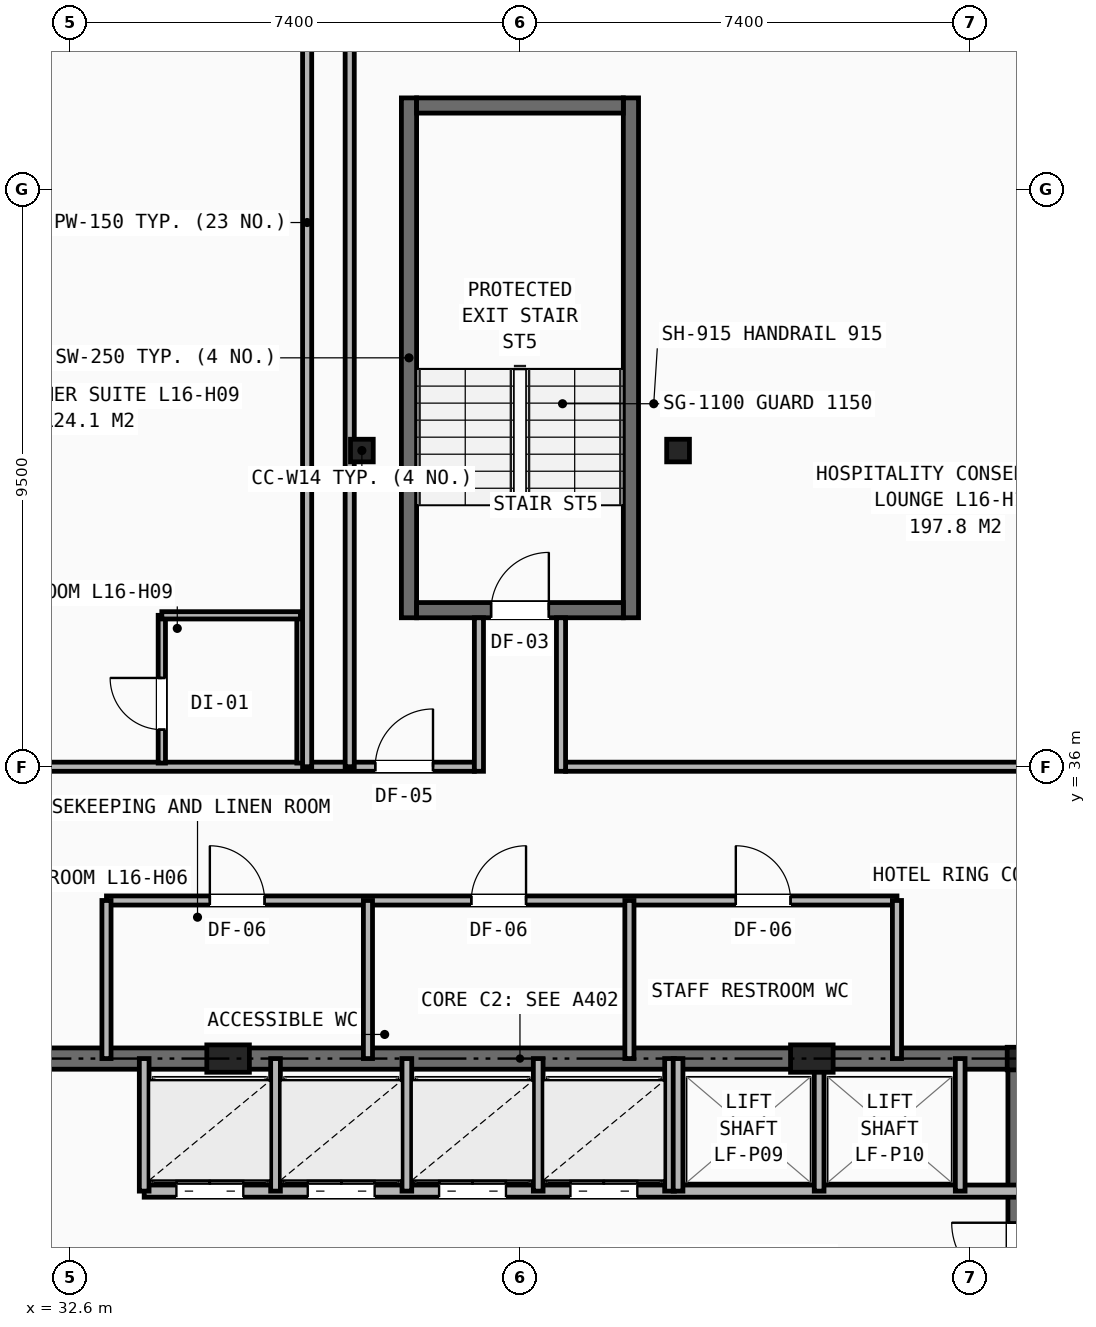
"""IFC4 building model, lengths in metres.
Left out: names, types, materials, properties, quantities, classifications, styles, units other than length and angle.
Written with IfcOpenShell. Run it as: python <this file> out.ifc"""

import sys

from ifc_helpers import new_model, si_unit, direction, frame, frame_2d, origin, origin_2d, place, context, subcontext, project, spatial, rectangle, i_section, extrude, element, fill, save


model = new_model("IFC4")
c1 = context("Model", 3, precision=1e-05, world=origin(), true_north=direction((0.0, 1.0)))
c2 = subcontext(c1, "Body", "Model", "MODEL_VIEW")
j1 = project(units=[si_unit("LENGTHUNIT", "METRE"), si_unit("PLANEANGLEUNIT", "RADIAN")], contexts=[c1])
p1 = place(None, origin())
s1 = spatial("IfcSite", under=j1, at=p1, CompositionType="ELEMENT")
p2 = place(p1, origin())
s2 = spatial("IfcBuilding", under=s1, at=p2, CompositionType="ELEMENT")
p3 = place(p2, frame((0.0, 0.0, 59.2)))
s3 = spatial("IfcBuildingStorey", under=s2, at=p3, CompositionType="ELEMENT", Elevation=59.2)
for number, where, z_axis, x_axis in (
    (1, (48.2, 31.2, 0.0), (0.0, 0.0, 1.0), (1.0, 0.0, 0.0)),
    (2, (37.4, 41.2, 0.0), (0.0, 0.0, 1.0), (1.0, 0.0, 0.0)),
    (3, (42.6, 41.2, 0.0), (0.0, 0.0, 1.0), (1.0, 0.0, 0.0)),
):
    element("IfcColumn", number, at=place(p3, frame(where, z_axis=z_axis, x_axis=x_axis)), inside=s3, PredefinedType="COLUMN", context=c2, shape_type="SweptSolid", body=[
        extrude(i_section(OverallWidth=0.374, OverallDepth=0.372, WebThickness=0.016, FlangeThickness=0.026, at=origin_2d()), origin(), (0.0, 0.0, 1.0), 3.2),
    ])
for number, where, z_axis, x_axis in (
    (4, (35.2, 31.2, 0.0), (0.0, 0.0, 1.0), (1.0, 0.0, 0.0)),
    (5, (44.8, 31.2, 0.0), (0.0, 0.0, 1.0), (1.0, 0.0, 0.0)),
):
    element("IfcColumn", number, at=place(p3, frame(where, z_axis=z_axis, x_axis=x_axis)), inside=s3, PredefinedType="PILASTER", context=c2, shape_type="SweptSolid", body=[
        extrude(rectangle(XDim=0.7, YDim=0.45, at=origin_2d()), origin(), (0.0, 0.0, 1.0), 3.2),
    ])
p4 = place(p3, frame((31.8, 31.2, 0.0), z_axis=(0.0, 0.0, 1.0), x_axis=(1.0, 0.0, 0.0)))
e6 = element("IfcWall", 6, at=p4, inside=s3, PredefinedType="SHEAR", context=c2, shape_type="SweptSolid", body=[
    extrude(rectangle(XDim=16.4, YDim=0.35, at=frame_2d((8.2, 0.0))), origin(), (0.0, 0.0, 1.0), 2.98),
])
p5 = place(p3, frame((48.2, 16.4, 0.0), z_axis=(0.0, 0.0, 1.0), x_axis=(0.0, 1.0, 0.0)))
e7 = element("IfcWall", 7, at=p5, inside=s3, PredefinedType="SHEAR", context=c2, shape_type="SweptSolid", body=[
    extrude(rectangle(XDim=14.8, YDim=0.35, at=frame_2d((7.4, 0.0))), origin(), (0.0, 0.0, 1.0), 2.98),
])
p6 = place(p5, frame((11.0, 0.0, 0.0)))
e8 = element("IfcOpeningElement", 8, at=p6, cuts=e7, PredefinedType="OPENING", context=c2, shape_type="SweptSolid", body=[
    extrude(rectangle(XDim=1.1, YDim=2.15, at=frame_2d((0.55, 1.075))), frame((0.0, 0.185, 0.0), z_axis=(0.0, -1.0, 0.0), x_axis=(1.0, 0.0, 0.0)), (0.0, 0.0, 1.0), 0.37),
])
p7 = place(p3, frame((33.82, 29.02, 0.0), z_axis=(0.0, 0.0, 1.0), x_axis=(1.0, 0.0, 0.0)))
e9 = element("IfcWall", 9, at=p7, inside=s3, PredefinedType="SOLIDWALL", context=c2, shape_type="SweptSolid", body=[
    extrude(rectangle(XDim=14.38, YDim=0.2, at=frame_2d((7.19, 0.0))), origin(), (0.0, 0.0, 1.0), 2.431),
])
p8 = place(p7, frame((0.53, 0.0, 0.0)))
e10 = element("IfcOpeningElement", 10, at=p8, cuts=e9, PredefinedType="OPENING", context=c2, shape_type="SweptSolid", body=[
    extrude(rectangle(XDim=1.1, YDim=2.15, at=frame_2d((0.55, 1.075))), frame((0.0, 0.11, 0.0), z_axis=(0.0, -1.0, 0.0), x_axis=(1.0, 0.0, 0.0)), (0.0, 0.0, 1.0), 0.22),
])
p9 = place(p7, frame((2.69, 0.0, 0.0)))
e11 = element("IfcOpeningElement", 11, at=p9, cuts=e9, PredefinedType="OPENING", context=c2, shape_type="SweptSolid", body=[
    extrude(rectangle(XDim=1.1, YDim=2.15, at=frame_2d((0.55, 1.075))), frame((0.0, 0.11, 0.0), z_axis=(0.0, -1.0, 0.0), x_axis=(1.0, 0.0, 0.0)), (0.0, 0.0, 1.0), 0.22),
])
p10 = place(p7, frame((4.85, 0.0, 0.0)))
e12 = element("IfcOpeningElement", 12, at=p10, cuts=e9, PredefinedType="OPENING", context=c2, shape_type="SweptSolid", body=[
    extrude(rectangle(XDim=1.1, YDim=2.15, at=frame_2d((0.55, 1.075))), frame((0.0, 0.11, 0.0), z_axis=(0.0, -1.0, 0.0), x_axis=(1.0, 0.0, 0.0)), (0.0, 0.0, 1.0), 0.22),
])
p11 = place(p7, frame((7.01, 0.0, 0.0)))
e13 = element("IfcOpeningElement", 13, at=p11, cuts=e9, PredefinedType="OPENING", context=c2, shape_type="SweptSolid", body=[
    extrude(rectangle(XDim=1.1, YDim=2.15, at=frame_2d((0.55, 1.075))), frame((0.0, 0.11, 0.0), z_axis=(0.0, -1.0, 0.0), x_axis=(1.0, 0.0, 0.0)), (0.0, 0.0, 1.0), 0.22),
])
for number, where, z_axis, x_axis in (
    (14, (33.82, 29.02, 0.0), (0.0, 0.0, 1.0), (0.0, 1.0, 0.0)),
    (15, (35.98, 29.02, 0.0), (0.0, 0.0, 1.0), (0.0, 1.0, 0.0)),
    (16, (38.14, 29.02, 0.0), (0.0, 0.0, 1.0), (0.0, 1.0, 0.0)),
    (17, (40.3, 29.02, 0.0), (0.0, 0.0, 1.0), (0.0, 1.0, 0.0)),
    (18, (42.46, 29.02, 0.0), (0.0, 0.0, 1.0), (0.0, 1.0, 0.0)),
    (19, (42.6, 29.02, 0.0), (0.0, 0.0, 1.0), (0.0, 1.0, 0.0)),
    (20, (44.92, 29.02, 0.0), (0.0, 0.0, 1.0), (0.0, 1.0, 0.0)),
    (21, (47.24, 29.02, 0.0), (0.0, 0.0, 1.0), (0.0, 1.0, 0.0)),
):
    element("IfcWall", number, at=place(p3, frame(where, z_axis=z_axis, x_axis=x_axis)), inside=s3, PredefinedType="SOLIDWALL", context=c2, shape_type="SweptSolid", body=[
        extrude(rectangle(XDim=2.18, YDim=0.16, at=frame_2d((1.09, 0.0))), origin(), (0.0, 0.0, 1.0), 2.431),
    ])
p12 = place(p3, frame((33.2, 33.8, 0.0), z_axis=(0.0, 0.0, 1.0), x_axis=(1.0, 0.0, 0.0)))
e22 = element("IfcWall", 22, at=p12, inside=s3, PredefinedType="PARTITIONING", context=c2, shape_type="SweptSolid", body=[
    extrude(rectangle(XDim=13.0, YDim=0.15, at=frame_2d((6.5, 0.0))), origin(), (0.0, 0.0, 1.0), 2.98),
])
p13 = place(p12, frame((1.7, 0.0, 0.0)))
e23 = element("IfcOpeningElement", 23, at=p13, cuts=e22, PredefinedType="OPENING", context=c2, shape_type="SweptSolid", body=[
    extrude(rectangle(XDim=0.9, YDim=2.1, at=frame_2d((0.45, 1.05))), frame((0.0, 0.085, 0.0), z_axis=(0.0, -1.0, 0.0), x_axis=(1.0, 0.0, 0.0)), (0.0, 0.0, 1.0), 0.17),
])
p14 = place(p12, frame((6.0, 0.0, 0.0)))
e24 = element("IfcOpeningElement", 24, at=p14, cuts=e22, PredefinedType="OPENING", context=c2, shape_type="SweptSolid", body=[
    extrude(rectangle(XDim=0.9, YDim=2.1, at=frame_2d((0.45, 1.05))), frame((0.0, 0.085, 0.0), z_axis=(0.0, -1.0, 0.0), x_axis=(1.0, 0.0, 0.0)), (0.0, 0.0, 1.0), 0.17),
])
p15 = place(p12, frame((10.35, 0.0, 0.0)))
e25 = element("IfcOpeningElement", 25, at=p15, cuts=e22, PredefinedType="OPENING", context=c2, shape_type="SweptSolid", body=[
    extrude(rectangle(XDim=0.9, YDim=2.1, at=frame_2d((0.45, 1.05))), frame((0.0, 0.085, 0.0), z_axis=(0.0, -1.0, 0.0), x_axis=(1.0, 0.0, 0.0)), (0.0, 0.0, 1.0), 0.17),
])
for number, where, z_axis, x_axis in (
    (26, (33.2, 31.2, 0.0), (0.0, 0.0, 1.0), (0.0, 1.0, 0.0)),
    (27, (46.2, 31.2, 0.0), (0.0, 0.0, 1.0), (0.0, 1.0, 0.0)),
    (28, (37.5, 31.2, 0.0), (0.0, 0.0, 1.0), (0.0, 1.0, 0.0)),
    (29, (41.8, 31.2, 0.0), (0.0, 0.0, 1.0), (0.0, 1.0, 0.0)),
):
    element("IfcWall", number, at=place(p3, frame(where, z_axis=z_axis, x_axis=x_axis)), inside=s3, PredefinedType="PARTITIONING", context=c2, shape_type="SweptSolid", body=[
        extrude(rectangle(XDim=2.6, YDim=0.15, at=frame_2d((1.3, 0.0))), origin(), (0.0, 0.0, 1.0), 2.431),
    ])
p16 = place(p3, frame((29.6, 36.0, 0.0), z_axis=(0.0, 0.0, 1.0), x_axis=(1.0, 0.0, 0.0)))
e30 = element("IfcWall", 30, at=p16, inside=s3, PredefinedType="PARTITIONING", context=c2, shape_type="SweptSolid", body=[
    extrude(rectangle(XDim=9.65, YDim=0.15, at=frame_2d((4.825, 0.0))), origin(), (0.0, 0.0, 1.0), 2.98),
])
p17 = place(p16, frame((0.57, 0.0, 0.0)))
e31 = element("IfcOpeningElement", 31, at=p17, cuts=e30, PredefinedType="OPENING", context=c2, shape_type="SweptSolid", body=[
    extrude(rectangle(XDim=0.95, YDim=2.1, at=frame_2d((0.475, 1.05))), frame((0.0, 0.085, 0.0), z_axis=(0.0, -1.0, 0.0), x_axis=(1.0, 0.0, 0.0)), (0.0, 0.0, 1.0), 0.17),
])
p18 = place(p16, frame((8.02, 0.0, 0.0)))
e32 = element("IfcOpeningElement", 32, at=p18, cuts=e30, PredefinedType="OPENING", context=c2, shape_type="SweptSolid", body=[
    extrude(rectangle(XDim=0.95, YDim=2.1, at=frame_2d((0.475, 1.05))), frame((0.0, 0.085, 0.0), z_axis=(0.0, -1.0, 0.0), x_axis=(1.0, 0.0, 0.0)), (0.0, 0.0, 1.0), 0.17),
])
p19 = place(p3, frame((40.75, 36.0, 0.0), z_axis=(0.0, 0.0, 1.0), x_axis=(1.0, 0.0, 0.0)))
e33 = element("IfcWall", 33, at=p19, inside=s3, PredefinedType="PARTITIONING", context=c2, shape_type="SweptSolid", body=[
    extrude(rectangle(XDim=9.65, YDim=0.15, at=frame_2d((4.825, 0.0))), origin(), (0.0, 0.0, 1.0), 2.513),
])
p20 = place(p3, frame((34.11, 36.06, 0.0), z_axis=(0.0, 0.0, 1.0), x_axis=(0.0, 1.0, 0.0)))
e34 = element("IfcWall", 34, at=p20, inside=s3, PredefinedType="PARTITIONING", context=c2, shape_type="SweptSolid", body=[
    extrude(rectangle(XDim=2.43, YDim=0.12, at=frame_2d((1.215, 0.0))), origin(), (0.0, 0.0, 1.0), 2.98),
])
p21 = place(p20, frame((0.55, 0.0, 0.0)))
e35 = element("IfcOpeningElement", 35, at=p21, cuts=e34, PredefinedType="OPENING", context=c2, shape_type="SweptSolid", body=[
    extrude(rectangle(XDim=0.85, YDim=2.05, at=frame_2d((0.425, 1.025))), frame((0.0, 0.07, 0.0), z_axis=(0.0, -1.0, 0.0), x_axis=(1.0, 0.0, 0.0)), (0.0, 0.0, 1.0), 0.14),
])
p22 = place(p3, frame((36.39, 36.06, 0.0), z_axis=(0.0, 0.0, 1.0), x_axis=(0.0, 1.0, 0.0)))
e36 = element("IfcWall", 36, at=p22, inside=s3, PredefinedType="PARTITIONING", context=c2, shape_type="SweptSolid", body=[
    extrude(rectangle(XDim=2.43, YDim=0.12, at=frame_2d((1.215, 0.0))), origin(), (0.0, 0.0, 1.0), 2.98),
])
p23 = place(p3, frame((34.11, 38.49, 0.0), z_axis=(0.0, 0.0, 1.0), x_axis=(1.0, 0.0, 0.0)))
e37 = element("IfcWall", 37, at=p23, inside=s3, PredefinedType="PARTITIONING", context=c2, shape_type="SweptSolid", body=[
    extrude(rectangle(XDim=2.28, YDim=0.12, at=frame_2d((1.14, 0.0))), origin(), (0.0, 0.0, 1.0), 2.98),
])
for number, where, z_axis, x_axis in (
    (38, (36.5, 36.0, 0.0), (0.0, 0.0, 1.0), (0.0, 1.0, 0.0)),
    (39, (37.2, 36.0, 0.0), (0.0, 0.0, 1.0), (0.0, 1.0, 0.0)),
):
    element("IfcWall", number, at=place(p3, frame(where, z_axis=z_axis, x_axis=x_axis)), inside=s3, PredefinedType="PARTITIONING", context=c2, shape_type="SweptSolid", body=[
        extrude(rectangle(XDim=17.9, YDim=0.15, at=frame_2d((8.95, 0.0))), origin(), (0.0, 0.0, 1.0), 2.191),
    ])
for number, where, z_axis, x_axis in (
    (40, (38.175, 38.45, 0.0), (0.0, 0.0, 1.0), (0.0, 1.0, 0.0)),
    (41, (41.825, 38.45, 0.0), (0.0, 0.0, 1.0), (0.0, 1.0, 0.0)),
):
    element("IfcWall", number, at=place(p3, frame(where, z_axis=z_axis, x_axis=x_axis)), inside=s3, PredefinedType="SHEAR", context=c2, shape_type="SweptSolid", body=[
        extrude(rectangle(XDim=8.55, YDim=0.25, at=frame_2d((4.275, 0.0))), origin(), (0.0, 0.0, 1.0), 2.98),
    ])
p24 = place(p3, frame((38.3, 38.575, 0.0), z_axis=(0.0, 0.0, 1.0), x_axis=(1.0, 0.0, 0.0)))
e42 = element("IfcWall", 42, at=p24, inside=s3, PredefinedType="SHEAR", context=c2, shape_type="SweptSolid", body=[
    extrude(rectangle(XDim=3.4, YDim=0.25, at=frame_2d((1.7, 0.0))), origin(), (0.0, 0.0, 1.0), 2.98),
])
p25 = place(p24, frame((1.225, 0.0, 0.0)))
e43 = element("IfcOpeningElement", 43, at=p25, cuts=e42, PredefinedType="OPENING", context=c2, shape_type="SweptSolid", body=[
    extrude(rectangle(XDim=0.95, YDim=2.1, at=frame_2d((0.475, 1.05))), frame((0.0, 0.135, 0.0), z_axis=(0.0, -1.0, 0.0), x_axis=(1.0, 0.0, 0.0)), (0.0, 0.0, 1.0), 0.27),
])
p26 = place(p3, frame((38.3, 46.875, 0.0), z_axis=(0.0, 0.0, 1.0), x_axis=(1.0, 0.0, 0.0)))
e44 = element("IfcWall", 44, at=p26, inside=s3, PredefinedType="SHEAR", context=c2, shape_type="SweptSolid", body=[
    extrude(rectangle(XDim=3.4, YDim=0.25, at=frame_2d((1.7, 0.0))), origin(), (0.0, 0.0, 1.0), 2.98),
])
for number, where, z_axis, x_axis in (
    (45, (39.325, 35.925, 0.0), (0.0, 0.0, 1.0), (0.0, 1.0, 0.0)),
    (46, (40.675, 35.925, 0.0), (0.0, 0.0, 1.0), (0.0, 1.0, 0.0)),
):
    element("IfcWall", number, at=place(p3, frame(where, z_axis=z_axis, x_axis=x_axis)), inside=s3, PredefinedType="PARTITIONING", context=c2, shape_type="SweptSolid", body=[
        extrude(rectangle(XDim=2.525, YDim=0.15, at=frame_2d((1.262, 0.0))), origin(), (0.0, 0.0, 1.0), 2.98),
    ])
p27 = place(p8, origin())
e47 = element("IfcDoor", 47, at=p27, inside=s3, OperationType="DOUBLE_DOOR_SLIDING", PredefinedType="DOOR", context=c2, shape_type="SweptSolid", body=[
    extrude(rectangle(XDim=1.1, YDim=2.15, at=frame_2d((0.55, 1.075))), frame((0.0, 0.025, 0.0), z_axis=(0.0, -1.0, 0.0), x_axis=(1.0, 0.0, 0.0)), (0.0, 0.0, 1.0), 0.05),
])
fill(e10, e47)
p28 = place(p9, origin())
e48 = element("IfcDoor", 48, at=p28, inside=s3, OperationType="DOUBLE_DOOR_SLIDING", PredefinedType="DOOR", context=c2, shape_type="SweptSolid", body=[
    extrude(rectangle(XDim=1.1, YDim=2.15, at=frame_2d((0.55, 1.075))), frame((0.0, 0.025, 0.0), z_axis=(0.0, -1.0, 0.0), x_axis=(1.0, 0.0, 0.0)), (0.0, 0.0, 1.0), 0.05),
])
fill(e11, e48)
p29 = place(p10, origin())
e49 = element("IfcDoor", 49, at=p29, inside=s3, OperationType="DOUBLE_DOOR_SLIDING", PredefinedType="DOOR", context=c2, shape_type="SweptSolid", body=[
    extrude(rectangle(XDim=1.1, YDim=2.15, at=frame_2d((0.55, 1.075))), frame((0.0, 0.025, 0.0), z_axis=(0.0, -1.0, 0.0), x_axis=(1.0, 0.0, 0.0)), (0.0, 0.0, 1.0), 0.05),
])
fill(e12, e49)
p30 = place(p11, origin())
e50 = element("IfcDoor", 50, at=p30, inside=s3, OperationType="DOUBLE_DOOR_SLIDING", PredefinedType="DOOR", context=c2, shape_type="SweptSolid", body=[
    extrude(rectangle(XDim=1.1, YDim=2.15, at=frame_2d((0.55, 1.075))), frame((0.0, 0.025, 0.0), z_axis=(0.0, -1.0, 0.0), x_axis=(1.0, 0.0, 0.0)), (0.0, 0.0, 1.0), 0.05),
])
fill(e13, e50)
p31 = place(p13, origin())
e51 = element("IfcDoor", 51, at=p31, inside=s3, OperationType="SINGLE_SWING_LEFT", PredefinedType="DOOR", context=c2, shape_type="SweptSolid", body=[
    extrude(rectangle(XDim=0.9, YDim=2.1, at=frame_2d((0.45, 1.05))), frame((0.0, 0.025, 0.0), z_axis=(0.0, -1.0, 0.0), x_axis=(1.0, 0.0, 0.0)), (0.0, 0.0, 1.0), 0.05),
])
fill(e23, e51)
p32 = place(p14, origin())
e52 = element("IfcDoor", 52, at=p32, inside=s3, OperationType="SINGLE_SWING_RIGHT", PredefinedType="DOOR", context=c2, shape_type="SweptSolid", body=[
    extrude(rectangle(XDim=0.9, YDim=2.1, at=frame_2d((0.45, 1.05))), frame((0.0, 0.025, 0.0), z_axis=(0.0, -1.0, 0.0), x_axis=(1.0, 0.0, 0.0)), (0.0, 0.0, 1.0), 0.05),
])
fill(e24, e52)
p33 = place(p15, origin())
e53 = element("IfcDoor", 53, at=p33, inside=s3, OperationType="SINGLE_SWING_LEFT", PredefinedType="DOOR", context=c2, shape_type="SweptSolid", body=[
    extrude(rectangle(XDim=0.9, YDim=2.1, at=frame_2d((0.45, 1.05))), frame((0.0, 0.025, 0.0), z_axis=(0.0, -1.0, 0.0), x_axis=(1.0, 0.0, 0.0)), (0.0, 0.0, 1.0), 0.05),
])
fill(e25, e53)
p34 = place(p21, origin())
e54 = element("IfcDoor", 54, at=p34, inside=s3, OperationType="SINGLE_SWING_RIGHT", PredefinedType="DOOR", context=c2, shape_type="SweptSolid", body=[
    extrude(rectangle(XDim=0.85, YDim=2.05, at=frame_2d((0.425, 1.025))), frame((0.0, 0.025, 0.0), z_axis=(0.0, -1.0, 0.0), x_axis=(1.0, 0.0, 0.0)), (0.0, 0.0, 1.0), 0.05),
])
fill(e35, e54)
p35 = place(p18, origin())
e55 = element("IfcDoor", 55, at=p35, inside=s3, OperationType="SINGLE_SWING_RIGHT", PredefinedType="DOOR", context=c2, shape_type="SweptSolid", body=[
    extrude(rectangle(XDim=0.95, YDim=2.1, at=frame_2d((0.475, 1.05))), frame((0.0, 0.025, 0.0), z_axis=(0.0, -1.0, 0.0), x_axis=(1.0, 0.0, 0.0)), (0.0, 0.0, 1.0), 0.05),
])
fill(e32, e55)
p36 = place(p25, origin())
e56 = element("IfcDoor", 56, at=p36, inside=s3, OperationType="SINGLE_SWING_RIGHT", PredefinedType="DOOR", context=c2, shape_type="SweptSolid", body=[
    extrude(rectangle(XDim=0.95, YDim=2.1, at=frame_2d((0.475, 1.05))), frame((0.0, 0.025, 0.0), z_axis=(0.0, -1.0, 0.0), x_axis=(1.0, 0.0, 0.0)), (0.0, 0.0, 1.0), 0.05),
])
fill(e43, e56)
save(model, sys.argv[1])
